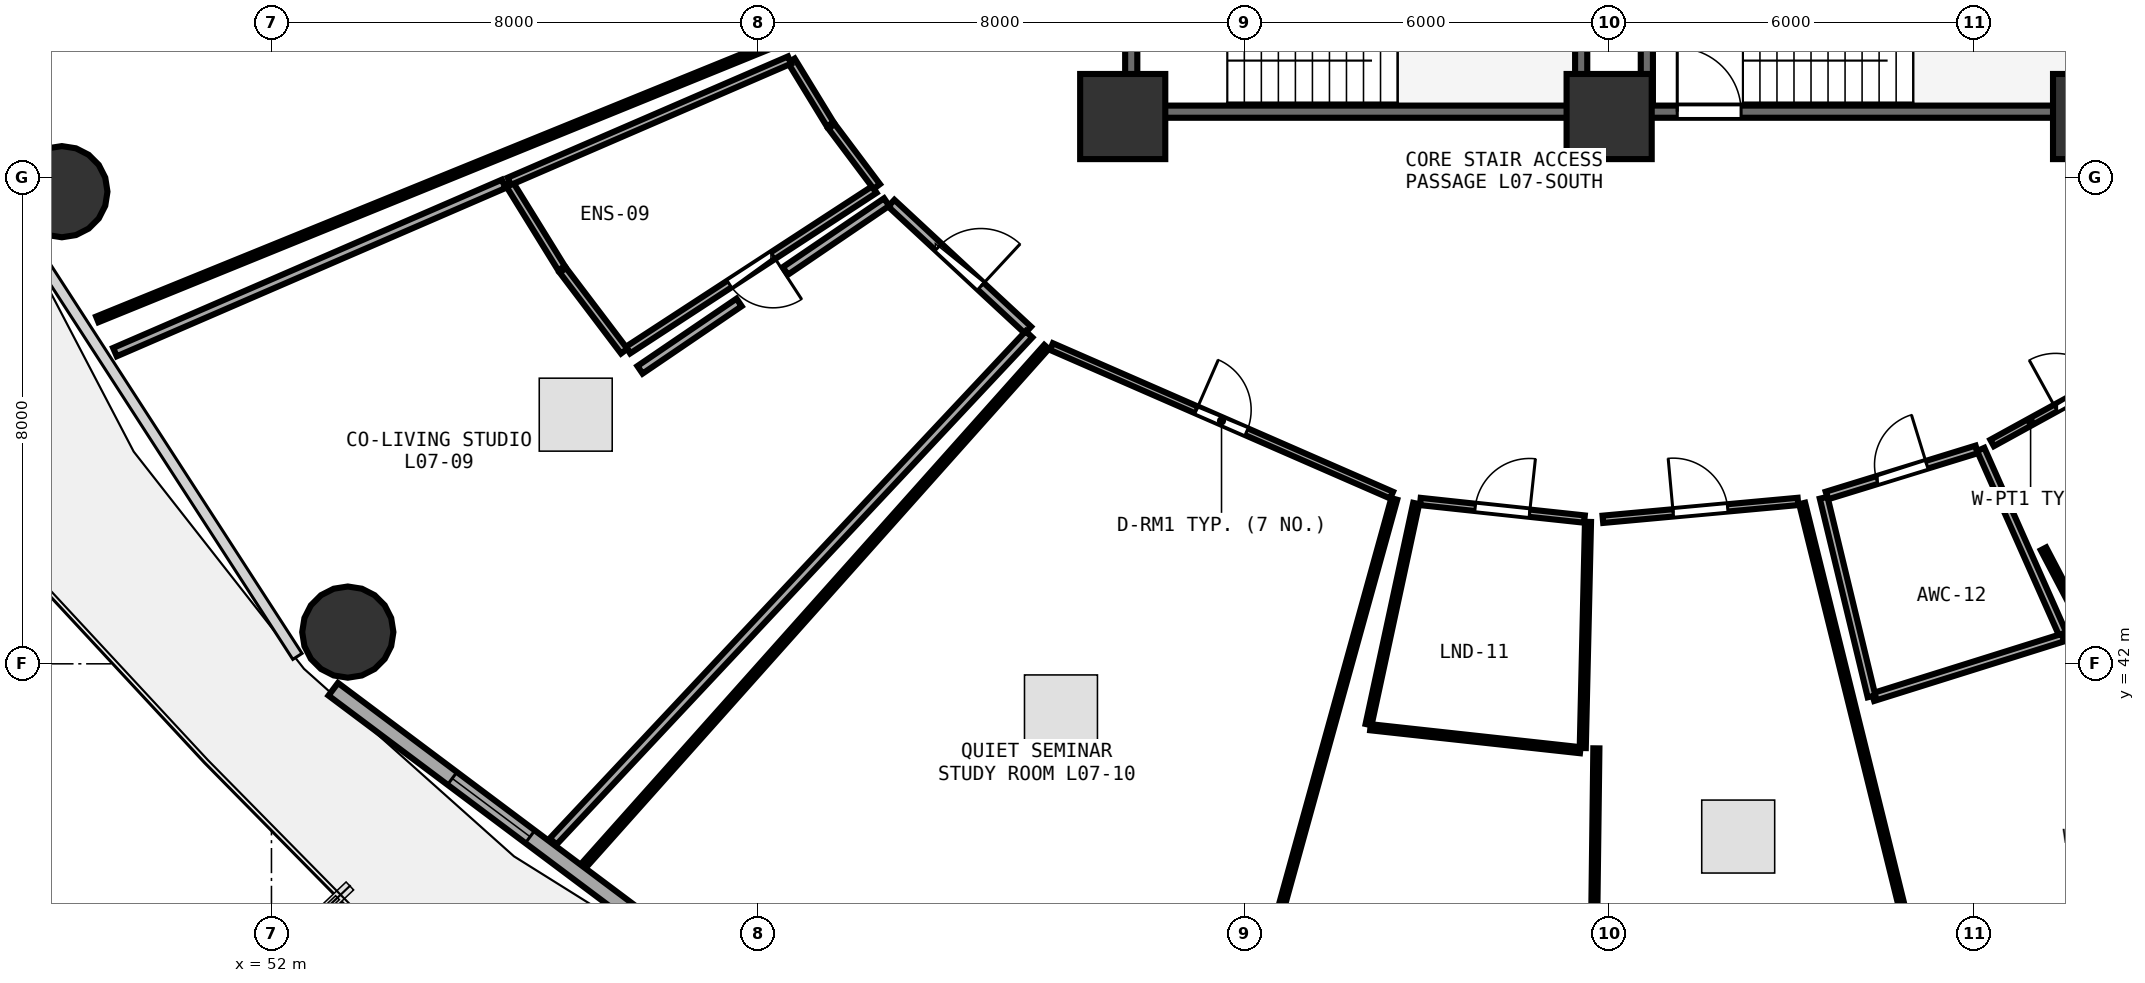
"""IFC4 building model, lengths in metres.
Left out: names, types, materials, properties, quantities, classifications, styles, units other than length and angle.
Written with IfcOpenShell. Run it as: python <this file> out.ifc"""

import sys

from ifc_helpers import new_model, si_unit, direction, frame, frame_2d, origin, origin_2d, place, context, subcontext, project, spatial, rectangle, circle, extrude, element, fill, save


model = new_model("IFC4")
c1 = context("Model", 3, precision=1e-05, world=origin(), true_north=direction((0.0, 1.0)))
c2 = subcontext(c1, "Body", "Model", "MODEL_VIEW")
j1 = project(units=[si_unit("LENGTHUNIT", "METRE"), si_unit("PLANEANGLEUNIT", "RADIAN")], contexts=[c1])
p1 = place(None, origin())
s1 = spatial("IfcSite", under=j1, at=p1, CompositionType="ELEMENT")
p2 = place(p1, origin())
s2 = spatial("IfcBuilding", under=s1, at=p2, CompositionType="ELEMENT")
p3 = place(p2, frame((0.0, 0.0, 30.0)))
s3 = spatial("IfcBuildingStorey", under=s2, at=p3, CompositionType="ELEMENT", Elevation=30.0)
for number, where, z_axis, x_axis in (
    (1, (66.0, 51.0, 0.0), (0.0, 0.0, 1.0), (1.0, 0.0, 0.0)),
    (2, (74.0, 51.0, 0.0), (0.0, 0.0, 1.0), (1.0, 0.0, 0.0)),
    (3, (82.0, 51.0, 0.0), (0.0, 0.0, 1.0), (1.0, 0.0, 0.0)),
):
    element("IfcColumn", number, at=place(p3, frame(where, z_axis=z_axis, x_axis=x_axis)), inside=s3, PredefinedType="PILASTER", context=c2, shape_type="SweptSolid", body=[
        extrude(rectangle(XDim=1.4, YDim=1.4, at=origin_2d()), origin(), (0.0, 0.0, 1.0), 3.75),
    ])
for number, where, z_axis, x_axis in (
    (4, (48.553, 49.764, 0.0), (0.0, 0.0, 1.0), (1.0, 0.0, 0.0)),
    (5, (53.256, 42.522, 0.0), (0.0, 0.0, 1.0), (1.0, 0.0, 0.0)),
):
    element("IfcColumn", number, at=place(p3, frame(where, z_axis=z_axis, x_axis=x_axis)), inside=s3, PredefinedType="COLUMN", context=c2, shape_type="SweptSolid", body=[
        extrude(circle(Radius=0.75, at=origin_2d()), origin(), (0.0, 0.0, 1.0), 3.75),
    ])
p4 = place(p3, frame((53.016, 41.582, 0.0), z_axis=(0.0, 0.0, 1.0), x_axis=(0.80030733173, -0.599590005569, 0.0)))
e6 = element("IfcWall", 6, at=p4, inside=s3, PredefinedType="SOLIDWALL", context=c2, shape_type="SweptSolid", body=[
    extrude(rectangle(XDim=8.291, YDim=0.26, at=frame_2d((4.145, 0.0))), origin(), (0.0, 0.0, 1.0), 3.475),
])
p5 = place(p4, frame((2.445, 0.0, 0.85)))
e7 = element("IfcOpeningElement", 7, at=p5, cuts=e6, PredefinedType="OPENING", context=c2, shape_type="SweptSolid", body=[
    extrude(rectangle(XDim=1.6, YDim=1.45, at=frame_2d((0.8, 0.725))), frame((0.0, 0.14, 0.0), z_axis=(0.0, -1.0, 0.0), x_axis=(1.0, 0.0, 0.0)), (0.0, 0.0, 1.0), 0.28),
])
p6 = place(p3, frame((74.0, 51.08, 0.0), z_axis=(0.0, 0.0, 1.0), x_axis=(1.0, 0.0, 0.0)))
e8 = element("IfcWall", 8, at=p6, inside=s3, PredefinedType="SHEAR", context=c2, shape_type="SweptSolid", body=[
    extrude(rectangle(XDim=7.9, YDim=0.2, at=frame_2d((3.95, 0.0))), origin(), (0.0, 0.0, 1.0), 3.49),
])
p7 = place(p6, frame((1.12, 0.0, 0.0)))
e9 = element("IfcOpeningElement", 9, at=p7, cuts=e8, PredefinedType="OPENING", context=c2, shape_type="SweptSolid", body=[
    extrude(rectangle(XDim=1.05, YDim=2.1, at=frame_2d((0.525, 1.05))), frame((0.0, 0.11, 0.0), z_axis=(0.0, -1.0, 0.0), x_axis=(1.0, 0.0, 0.0)), (0.0, 0.0, 1.0), 0.22),
])
p8 = place(p3, frame((74.62, 54.27, 0.0), z_axis=(0.0, 0.0, 1.0), x_axis=(0.0, -1.0, 0.0)))
e10 = element("IfcWall", 10, at=p8, inside=s3, PredefinedType="SHEAR", context=c2, shape_type="SweptSolid", body=[
    extrude(rectangle(XDim=3.07, YDim=0.2, at=frame_2d((1.535, 0.0))), origin(), (0.0, 0.0, 1.0), 3.49),
])
p9 = place(p3, frame((66.26, 51.08, 0.0), z_axis=(0.0, 0.0, 1.0), x_axis=(1.0, 0.0, 0.0)))
e11 = element("IfcWall", 11, at=p9, inside=s3, PredefinedType="SHEAR", context=c2, shape_type="SweptSolid", body=[
    extrude(rectangle(XDim=7.16, YDim=0.2, at=frame_2d((3.58, 0.0))), origin(), (0.0, 0.0, 1.0), 3.49),
])
p10 = place(p3, frame((73.54, 51.2, 0.0), z_axis=(0.0, 0.0, 1.0), x_axis=(0.0, 1.0, 0.0)))
e12 = element("IfcWall", 12, at=p10, inside=s3, PredefinedType="SHEAR", context=c2, shape_type="SweptSolid", body=[
    extrude(rectangle(XDim=3.07, YDim=0.2, at=frame_2d((1.535, 0.0))), origin(), (0.0, 0.0, 1.0), 3.49),
])
p11 = place(p3, frame((66.14, 54.27, 0.0), z_axis=(0.0, 0.0, 1.0), x_axis=(0.0, -1.0, 0.0)))
e13 = element("IfcWall", 13, at=p11, inside=s3, PredefinedType="SHEAR", context=c2, shape_type="SweptSolid", body=[
    extrude(rectangle(XDim=3.07, YDim=0.2, at=frame_2d((1.535, 0.0))), origin(), (0.0, 0.0, 1.0), 3.49),
])
p12 = place(p11, frame((1.01, 0.0, 0.0)))
e14 = element("IfcOpeningElement", 14, at=p12, cuts=e13, PredefinedType="OPENING", context=c2, shape_type="SweptSolid", body=[
    extrude(rectangle(XDim=1.05, YDim=2.1, at=frame_2d((0.525, 1.05))), frame((0.0, 0.11, 0.0), z_axis=(0.0, -1.0, 0.0), x_axis=(1.0, 0.0, 0.0)), (0.0, 0.0, 1.0), 0.22),
])
p13 = place(p3, frame((61.917, 49.8, 0.0), z_axis=(0.0, 0.0, 1.0), x_axis=(-0.837796261941, -0.545982988267, 0.0)))
e15 = element("IfcWall", 15, at=p13, inside=s3, PredefinedType="PLUMBINGWALL", context=c2, shape_type="SweptSolid", body=[
    extrude(rectangle(XDim=4.838, YDim=0.13, at=frame_2d((2.419, 0.0))), origin(), (0.0, 0.0, 1.0), 3.235),
])
p14 = place(p13, frame((1.989, 0.0, 0.0)))
e16 = element("IfcOpeningElement", 16, at=p14, cuts=e15, PredefinedType="OPENING", context=c2, shape_type="SweptSolid", body=[
    extrude(rectangle(XDim=0.86, YDim=2.05, at=frame_2d((0.43, 1.025))), frame((0.0, 0.075, 0.0), z_axis=(0.0, -1.0, 0.0), x_axis=(1.0, 0.0, 0.0)), (0.0, 0.0, 1.0), 0.15),
])
p15 = place(p3, frame((62.194, 49.575, 0.0), z_axis=(0.0, 0.0, 1.0), x_axis=(0.7329267348, -0.680307578538, 0.0)))
e17 = element("IfcWall", 17, at=p15, inside=s3, PredefinedType="PARTITIONING", context=c2, shape_type="SweptSolid", body=[
    extrude(rectangle(XDim=3.067, YDim=0.15, at=frame_2d((1.533, 0.0))), origin(), (0.0, 0.0, 1.0), 2.875),
])
p16 = place(p15, frame((1.059, 0.0, 0.0)))
e18 = element("IfcOpeningElement", 18, at=p16, cuts=e17, PredefinedType="OPENING", context=c2, shape_type="SweptSolid", body=[
    extrude(rectangle(XDim=0.95, YDim=2.08, at=frame_2d((0.475, 1.04))), frame((0.0, 0.085, 0.0), z_axis=(0.0, -1.0, 0.0), x_axis=(1.0, 0.0, 0.0)), (0.0, 0.0, 1.0), 0.17),
])
p17 = place(p3, frame((64.828, 47.217, 0.0), z_axis=(0.0, 0.0, 1.0), x_axis=(0.916419655578, -0.400218708797, 0.0)))
e19 = element("IfcWall", 19, at=p17, inside=s3, PredefinedType="PARTITIONING", context=c2, shape_type="SweptSolid", body=[
    extrude(rectangle(XDim=6.104, YDim=0.12, at=frame_2d((3.052, 0.0))), origin(), (0.0, 0.0, 1.0), 2.875),
])
p18 = place(p17, frame((2.602, 0.0, 0.0)))
e20 = element("IfcOpeningElement", 20, at=p18, cuts=e19, PredefinedType="OPENING", context=c2, shape_type="SweptSolid", body=[
    extrude(rectangle(XDim=0.9, YDim=2.08, at=frame_2d((0.45, 1.04))), frame((0.0, 0.07, 0.0), z_axis=(0.0, -1.0, 0.0), x_axis=(1.0, 0.0, 0.0)), (0.0, 0.0, 1.0), 0.14),
])
p19 = place(p3, frame((70.895, 44.67, 0.0), z_axis=(0.0, 0.0, 1.0), x_axis=(0.994302004983, -0.106599825921, 0.0)))
e21 = element("IfcWall", 21, at=p19, inside=s3, PredefinedType="PARTITIONING", context=c2, shape_type="SweptSolid", body=[
    extrude(rectangle(XDim=2.714, YDim=0.12, at=frame_2d((1.357, 0.0))), origin(), (0.0, 0.0, 1.0), 3.235),
])
p20 = place(p19, frame((0.907, 0.0, 0.0)))
e22 = element("IfcOpeningElement", 22, at=p20, cuts=e21, PredefinedType="OPENING", context=c2, shape_type="SweptSolid", body=[
    extrude(rectangle(XDim=0.9, YDim=2.08, at=frame_2d((0.45, 1.04))), frame((0.0, 0.07, 0.0), z_axis=(0.0, -1.0, 0.0), x_axis=(1.0, 0.0, 0.0)), (0.0, 0.0, 1.0), 0.14),
])
p21 = place(p3, frame((73.897, 44.376, 0.0), z_axis=(0.0, 0.0, 1.0), x_axis=(0.995829610124, 0.091232601628, 0.0)))
e23 = element("IfcWall", 23, at=p21, inside=s3, PredefinedType="PARTITIONING", context=c2, shape_type="SweptSolid", body=[
    extrude(rectangle(XDim=3.222, YDim=0.12, at=frame_2d((1.611, 0.0))), origin(), (0.0, 0.0, 1.0), 3.235),
])
p22 = place(p21, frame((1.161, 0.0, 0.0)))
e24 = element("IfcOpeningElement", 24, at=p22, cuts=e23, PredefinedType="OPENING", context=c2, shape_type="SweptSolid", body=[
    extrude(rectangle(XDim=0.9, YDim=2.08, at=frame_2d((0.45, 1.04))), frame((0.0, 0.07, 0.0), z_axis=(0.0, -1.0, 0.0), x_axis=(1.0, 0.0, 0.0)), (0.0, 0.0, 1.0), 0.14),
])
p23 = place(p3, frame((77.58, 44.768, 0.0), z_axis=(0.0, 0.0, 1.0), x_axis=(0.955754448098, 0.294165659011, 0.0)))
e25 = element("IfcWall", 25, at=p23, inside=s3, PredefinedType="PLUMBINGWALL", context=c2, shape_type="SweptSolid", body=[
    extrude(rectangle(XDim=2.579, YDim=0.13, at=frame_2d((1.29, 0.0))), origin(), (0.0, 0.0, 1.0), 3.235),
])
p24 = place(p23, frame((0.86, 0.0, 0.0)))
e26 = element("IfcOpeningElement", 26, at=p24, cuts=e25, PredefinedType="OPENING", context=c2, shape_type="SweptSolid", body=[
    extrude(rectangle(XDim=0.86, YDim=2.05, at=frame_2d((0.43, 1.025))), frame((0.0, 0.075, 0.0), z_axis=(0.0, -1.0, 0.0), x_axis=(1.0, 0.0, 0.0)), (0.0, 0.0, 1.0), 0.15),
])
p25 = place(p3, frame((80.299, 45.632, 0.0), z_axis=(0.0, 0.0, 1.0), x_axis=(0.876387079092, 0.481607399861, 0.0)))
e27 = element("IfcWall", 27, at=p25, inside=s3, PredefinedType="PARTITIONING", context=c2, shape_type="SweptSolid", body=[
    extrude(rectangle(XDim=3.281, YDim=0.12, at=frame_2d((1.641, 0.0))), origin(), (0.0, 0.0, 1.0), 2.875),
])
p26 = place(p25, frame((1.191, 0.0, 0.0)))
e28 = element("IfcOpeningElement", 28, at=p26, cuts=e27, PredefinedType="OPENING", context=c2, shape_type="SweptSolid", body=[
    extrude(rectangle(XDim=0.9, YDim=2.08, at=frame_2d((0.45, 1.04))), frame((0.0, 0.07, 0.0), z_axis=(0.0, -1.0, 0.0), x_axis=(1.0, 0.0, 0.0)), (0.0, 0.0, 1.0), 0.14),
])
p27 = place(p3, frame((60.343, 52.222, 0.0), z_axis=(0.0, 0.0, 1.0), x_axis=(-0.926333713065, -0.376703931542, 0.0)))
e29 = element("IfcWall", 29, at=p27, inside=s3, PredefinedType="PARTITIONING", context=c2, shape_type="SweptSolid", body=[
    extrude(rectangle(XDim=12.099, YDim=0.1, at=frame_2d((6.05, 0.0))), origin(), (0.0, 0.0, 1.0), 2.875),
])
p28 = place(p3, frame((60.549, 51.92, 0.0), z_axis=(0.0, 0.0, 1.0), x_axis=(0.52146609248, -0.853272004928, 0.0)))
e30 = element("IfcWall", 30, at=p28, inside=s3, PredefinedType="PLUMBINGWALL", context=c2, shape_type="SweptSolid", body=[
    extrude(rectangle(XDim=1.228, YDim=0.13, at=frame_2d((0.614, 0.0))), origin(), (0.0, 0.0, 1.0), 3.48),
])
p29 = place(p3, frame((61.212, 50.839, 0.0), z_axis=(0.0, 0.0, 1.0), x_axis=(0.600347056143, -0.79973959023, 0.0)))
e31 = element("IfcWall", 31, at=p29, inside=s3, PredefinedType="PLUMBINGWALL", context=c2, shape_type="SweptSolid", body=[
    extrude(rectangle(XDim=1.238, YDim=0.13, at=frame_2d((0.619, 0.0))), origin(), (0.0, 0.0, 1.0), 2.875),
])
p30 = place(p3, frame((57.801, 47.142, 0.0), z_axis=(0.0, 0.0, 1.0), x_axis=(-0.60376191721, 0.797164692725, 0.0)))
e32 = element("IfcWall", 32, at=p30, inside=s3, PredefinedType="PLUMBINGWALL", context=c2, shape_type="SweptSolid", body=[
    extrude(rectangle(XDim=1.669, YDim=0.13, at=frame_2d((0.834, 0.0))), origin(), (0.0, 0.0, 1.0), 3.175),
])
p31 = place(p3, frame((56.771, 48.505, 0.0), z_axis=(0.0, 0.0, 1.0), x_axis=(-0.525540089642, 0.850768837099, 0.0)))
e33 = element("IfcWall", 33, at=p31, inside=s3, PredefinedType="PLUMBINGWALL", context=c2, shape_type="SweptSolid", body=[
    extrude(rectangle(XDim=1.651, YDim=0.13, at=frame_2d((0.826, 0.0))), origin(), (0.0, 0.0, 1.0), 3.175),
])
p32 = place(p3, frame((55.91, 49.935, 0.0), z_axis=(0.0, 0.0, 1.0), x_axis=(0.917797204715, 0.397049481826, 0.0)))
e34 = element("IfcWall", 34, at=p32, inside=s3, PredefinedType="PLUMBINGWALL", context=c2, shape_type="SweptSolid", body=[
    extrude(rectangle(XDim=5.023, YDim=0.13, at=frame_2d((2.511, 0.0))), origin(), (0.0, 0.0, 1.0), 2.875),
])
p33 = place(p3, frame((64.458, 47.419, 0.0), z_axis=(0.0, 0.0, 1.0), x_axis=(-0.684261294523, -0.729236916796, 0.0)))
e35 = element("IfcWall", 35, at=p33, inside=s3, PredefinedType="PARTITIONING", context=c2, shape_type="SweptSolid", body=[
    extrude(rectangle(XDim=11.438, YDim=0.15, at=frame_2d((5.719, 0.0))), origin(), (0.0, 0.0, 1.0), 2.875),
])
p34 = place(p3, frame((49.426, 47.126, 0.0), z_axis=(0.0, 0.0, 1.0), x_axis=(0.917736225937, 0.397190407239, 0.0)))
e36 = element("IfcWall", 36, at=p34, inside=s3, PredefinedType="PARTITIONING", context=c2, shape_type="SweptSolid", body=[
    extrude(rectangle(XDim=6.967, YDim=0.15, at=frame_2d((3.483, 0.0))), origin(), (0.0, 0.0, 1.0), 2.875),
])
p35 = place(p3, frame((58.061, 46.834, 0.0), z_axis=(0.0, 0.0, 1.0), x_axis=(0.826811291248, 0.562479411769, 0.0)))
e37 = element("IfcWall", 37, at=p35, inside=s3, PredefinedType="PARTITIONING", context=c2, shape_type="SweptSolid", body=[
    extrude(rectangle(XDim=1.971, YDim=0.15, at=frame_2d((0.985, 0.0))), origin(), (0.0, 0.0, 1.0), 3.48),
])
p36 = place(p3, frame((60.451, 48.461, 0.0), z_axis=(0.0, 0.0, 1.0), x_axis=(0.826867883695, 0.562396215237, 0.0)))
e38 = element("IfcWall", 38, at=p36, inside=s3, PredefinedType="PARTITIONING", context=c2, shape_type="SweptSolid", body=[
    extrude(rectangle(XDim=2.014, YDim=0.15, at=frame_2d((1.007, 0.0))), origin(), (0.0, 0.0, 1.0), 3.235),
])
p37 = place(p3, frame((70.466, 44.711, 0.0), z_axis=(0.0, 0.0, 1.0), x_axis=(-0.26671307518, -0.963775977875, 0.0)))
e39 = element("IfcWall", 39, at=p37, inside=s3, PredefinedType="PARTITIONING", context=c2, shape_type="SweptSolid", body=[
    extrude(rectangle(XDim=10.865, YDim=0.1, at=frame_2d((5.432, 0.0))), origin(), (0.0, 0.0, 1.0), 2.875),
])
p38 = place(p3, frame((57.156, 38.706, 0.0), z_axis=(0.0, 0.0, 1.0), x_axis=(0.66580890104, 0.746122313897, 0.0)))
e40 = element("IfcWall", 40, at=p38, inside=s3, PredefinedType="PARTITIONING", context=c2, shape_type="SweptSolid", body=[
    extrude(rectangle(XDim=11.399, YDim=0.1, at=frame_2d((5.7, 0.0))), origin(), (0.0, 0.0, 1.0), 2.875),
])
p39 = place(p3, frame((73.652, 44.334, 0.0), z_axis=(0.0, 0.0, 1.0), x_axis=(-0.02316715399, -0.99973160547, 0.0)))
e41 = element("IfcWall", 41, at=p39, inside=s3, PredefinedType="PARTITIONING", context=c2, shape_type="SweptSolid", body=[
    extrude(rectangle(XDim=3.72, YDim=0.1, at=frame_2d((1.86, 0.0))), origin(), (0.0, 0.0, 1.0), 3.175),
])
p40 = place(p3, frame((73.525, 40.579, 0.0), z_axis=(0.0, 0.0, 1.0), x_axis=(-0.994070147468, 0.108740709544, 0.0)))
e42 = element("IfcWall", 42, at=p40, inside=s3, PredefinedType="PARTITIONING", context=c2, shape_type="SweptSolid", body=[
    extrude(rectangle(XDim=3.471, YDim=0.1, at=frame_2d((1.735, 0.0))), origin(), (0.0, 0.0, 1.0), 3.175),
])
p41 = place(p3, frame((70.043, 41.0, 0.0), z_axis=(0.0, 0.0, 1.0), x_axis=(0.210519412271, 0.977589677246, 0.0)))
e43 = element("IfcWall", 43, at=p41, inside=s3, PredefinedType="PARTITIONING", context=c2, shape_type="SweptSolid", body=[
    extrude(rectangle(XDim=3.72, YDim=0.1, at=frame_2d((1.86, 0.0))), origin(), (0.0, 0.0, 1.0), 3.175),
])
p42 = place(p3, frame((77.175, 44.637, 0.0), z_axis=(0.0, 0.0, 1.0), x_axis=(0.239971369295, -0.970779965759, 0.0)))
e44 = element("IfcWall", 44, at=p42, inside=s3, PredefinedType="PARTITIONING", context=c2, shape_type="SweptSolid", body=[
    extrude(rectangle(XDim=10.846, YDim=0.1, at=frame_2d((5.423, 0.0))), origin(), (0.0, 0.0, 1.0), 2.875),
])
p43 = place(p3, frame((73.701, 33.561, 0.0), z_axis=(0.0, 0.0, 1.0), x_axis=(0.012537113793, 0.9999214073, 0.0)))
e45 = element("IfcWall", 45, at=p43, inside=s3, PredefinedType="PARTITIONING", context=c2, shape_type="SweptSolid", body=[
    extrude(rectangle(XDim=7.049, YDim=0.1, at=frame_2d((3.525, 0.0))), origin(), (0.0, 0.0, 1.0), 2.875),
])
p44 = place(p3, frame((80.111, 45.526, 0.0), z_axis=(0.0, 0.0, 1.0), x_axis=(0.405936178007, -0.913901427608, 0.0)))
e46 = element("IfcWall", 46, at=p44, inside=s3, PredefinedType="PLUMBINGWALL", context=c2, shape_type="SweptSolid", body=[
    extrude(rectangle(XDim=3.36, YDim=0.13, at=frame_2d((1.68, 0.0))), origin(), (0.0, 0.0, 1.0), 2.875),
])
p45 = place(p3, frame((81.464, 42.431, 0.0), z_axis=(0.0, 0.0, 1.0), x_axis=(-0.954175708416, -0.299246917226, 0.0)))
e47 = element("IfcWall", 47, at=p45, inside=s3, PredefinedType="PLUMBINGWALL", context=c2, shape_type="SweptSolid", body=[
    extrude(rectangle(XDim=3.275, YDim=0.13, at=frame_2d((1.637, 0.0))), origin(), (0.0, 0.0, 1.0), 2.875),
])
p46 = place(p3, frame((78.315, 41.464, 0.0), z_axis=(0.0, 0.0, 1.0), x_axis=(-0.234406131581, 0.972138758345, 0.0)))
e48 = element("IfcWall", 48, at=p46, inside=s3, PredefinedType="PLUMBINGWALL", context=c2, shape_type="SweptSolid", body=[
    extrude(rectangle(XDim=3.36, YDim=0.13, at=frame_2d((1.68, 0.0))), origin(), (0.0, 0.0, 1.0), 3.235),
])
p47 = place(p3, frame((85.401, 35.769, 0.0), z_axis=(0.0, 0.0, 1.0), x_axis=(-0.464308397246, 0.885673592384, 0.0)))
e49 = element("IfcWall", 49, at=p47, inside=s3, PredefinedType="PARTITIONING", context=c2, shape_type="SweptSolid", body=[
    extrude(rectangle(XDim=9.17, YDim=0.1, at=frame_2d((4.585, 0.0))), origin(), (0.0, 0.0, 1.0), 2.875),
])
p48 = place(p5, origin())
e50 = element("IfcWindow", 50, at=p48, inside=s3, PartitioningType="SINGLE_PANEL", PredefinedType="WINDOW", context=c2, shape_type="SweptSolid", body=[
    extrude(rectangle(XDim=1.6, YDim=1.45, at=frame_2d((0.8, 0.725))), frame((0.0, 0.03, 0.0), z_axis=(0.0, -1.0, 0.0), x_axis=(1.0, 0.0, 0.0)), (0.0, 0.0, 1.0), 0.06),
])
fill(e7, e50)
p49 = place(p7, origin())
e51 = element("IfcDoor", 51, at=p49, inside=s3, OperationType="SINGLE_SWING_LEFT", PredefinedType="DOOR", context=c2, shape_type="SweptSolid", body=[
    extrude(rectangle(XDim=1.05, YDim=2.1, at=frame_2d((0.525, 1.05))), frame((0.0, 0.025, 0.0), z_axis=(0.0, -1.0, 0.0), x_axis=(1.0, 0.0, 0.0)), (0.0, 0.0, 1.0), 0.05),
])
fill(e9, e51)
p50 = place(p14, origin())
e52 = element("IfcDoor", 52, at=p50, inside=s3, OperationType="SINGLE_SWING_LEFT", PredefinedType="DOOR", context=c2, shape_type="SweptSolid", body=[
    extrude(rectangle(XDim=0.86, YDim=2.05, at=frame_2d((0.43, 1.025))), frame((0.0, 0.025, 0.0), z_axis=(0.0, -1.0, 0.0), x_axis=(1.0, 0.0, 0.0)), (0.0, 0.0, 1.0), 0.05),
])
fill(e16, e52)
p51 = place(p16, origin())
e53 = element("IfcDoor", 53, at=p51, inside=s3, OperationType="SINGLE_SWING_RIGHT", PredefinedType="DOOR", context=c2, shape_type="SweptSolid", body=[
    extrude(rectangle(XDim=0.95, YDim=2.08, at=frame_2d((0.475, 1.04))), frame((0.0, 0.025, 0.0), z_axis=(0.0, -1.0, 0.0), x_axis=(1.0, 0.0, 0.0)), (0.0, 0.0, 1.0), 0.05),
])
fill(e18, e53)
p52 = place(p18, origin())
e54 = element("IfcDoor", 54, at=p52, inside=s3, OperationType="SINGLE_SWING_LEFT", PredefinedType="DOOR", context=c2, shape_type="SweptSolid", body=[
    extrude(rectangle(XDim=0.9, YDim=2.08, at=frame_2d((0.45, 1.04))), frame((0.0, 0.025, 0.0), z_axis=(0.0, -1.0, 0.0), x_axis=(1.0, 0.0, 0.0)), (0.0, 0.0, 1.0), 0.05),
])
fill(e20, e54)
p53 = place(p20, origin())
e55 = element("IfcDoor", 55, at=p53, inside=s3, OperationType="SINGLE_SWING_RIGHT", PredefinedType="DOOR", context=c2, shape_type="SweptSolid", body=[
    extrude(rectangle(XDim=0.9, YDim=2.08, at=frame_2d((0.45, 1.04))), frame((0.0, 0.025, 0.0), z_axis=(0.0, -1.0, 0.0), x_axis=(1.0, 0.0, 0.0)), (0.0, 0.0, 1.0), 0.05),
])
fill(e22, e55)
p54 = place(p22, origin())
e56 = element("IfcDoor", 56, at=p54, inside=s3, OperationType="SINGLE_SWING_LEFT", PredefinedType="DOOR", context=c2, shape_type="SweptSolid", body=[
    extrude(rectangle(XDim=0.9, YDim=2.08, at=frame_2d((0.45, 1.04))), frame((0.0, 0.025, 0.0), z_axis=(0.0, -1.0, 0.0), x_axis=(1.0, 0.0, 0.0)), (0.0, 0.0, 1.0), 0.05),
])
fill(e24, e56)
p55 = place(p24, origin())
e57 = element("IfcDoor", 57, at=p55, inside=s3, OperationType="SINGLE_SWING_RIGHT", PredefinedType="DOOR", context=c2, shape_type="SweptSolid", body=[
    extrude(rectangle(XDim=0.86, YDim=2.05, at=frame_2d((0.43, 1.025))), frame((0.0, 0.025, 0.0), z_axis=(0.0, -1.0, 0.0), x_axis=(1.0, 0.0, 0.0)), (0.0, 0.0, 1.0), 0.05),
])
fill(e26, e57)
p56 = place(p26, origin())
e58 = element("IfcDoor", 58, at=p56, inside=s3, OperationType="SINGLE_SWING_LEFT", PredefinedType="DOOR", context=c2, shape_type="SweptSolid", body=[
    extrude(rectangle(XDim=0.9, YDim=2.08, at=frame_2d((0.45, 1.04))), frame((0.0, 0.025, 0.0), z_axis=(0.0, -1.0, 0.0), x_axis=(1.0, 0.0, 0.0)), (0.0, 0.0, 1.0), 0.05),
])
fill(e28, e58)
save(model, sys.argv[1])
